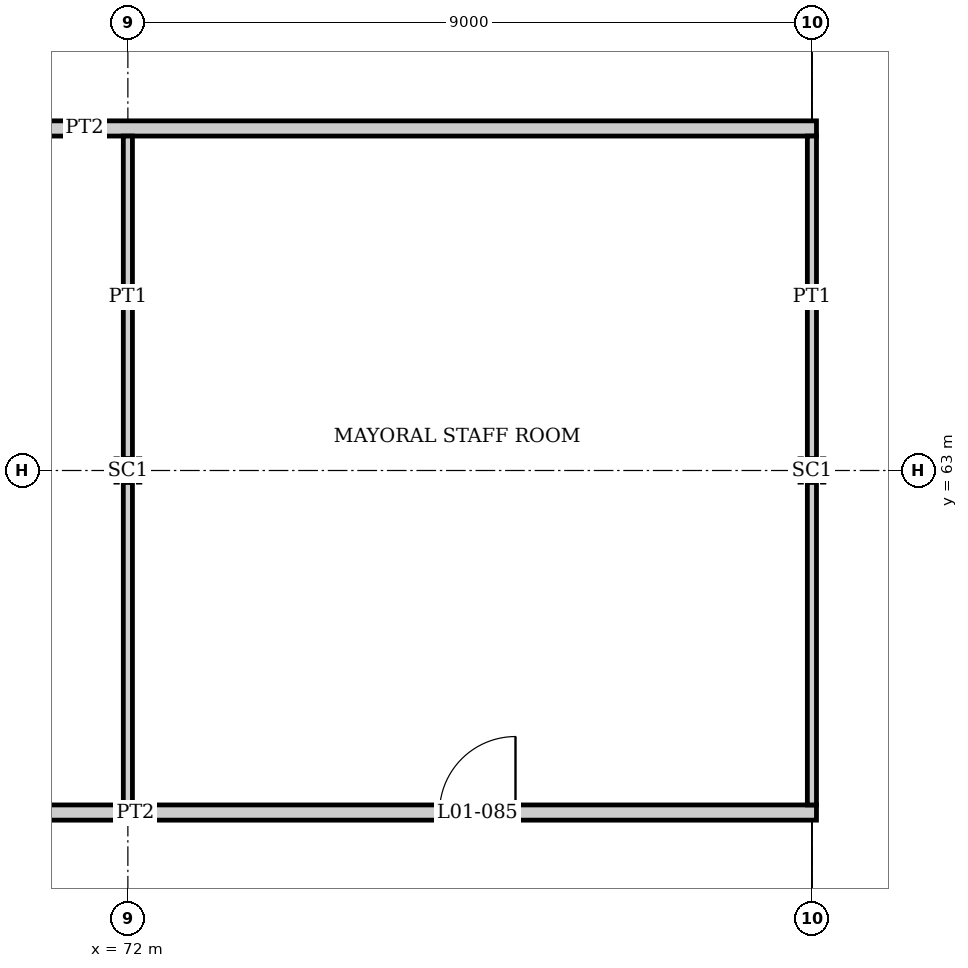
"""IFC4 building model, lengths in metres.
Left out: names, types, materials, properties, quantities, classifications, styles, units other than length and angle.
Written with IfcOpenShell. Run it as: python <this file> out.ifc"""

import sys

from ifc_helpers import new_model, si_unit, direction, frame, frame_2d, origin, origin_2d, place, context, subcontext, project, spatial, rectangle, i_section, extrude, element, fill, save


model = new_model("IFC4")
c1 = context("Model", 3, precision=1e-05, world=origin(), true_north=direction((0.0, 1.0)))
c2 = subcontext(c1, "Body", "Model", "MODEL_VIEW")
j1 = project(units=[si_unit("LENGTHUNIT", "METRE"), si_unit("PLANEANGLEUNIT", "RADIAN")], contexts=[c1])
p1 = place(None, origin())
s1 = spatial("IfcSite", under=j1, at=p1, CompositionType="ELEMENT")
p2 = place(p1, origin())
s2 = spatial("IfcBuilding", under=s1, at=p2, CompositionType="ELEMENT")
p3 = place(p2, frame((0.0, 0.0, 6.0)))
s3 = spatial("IfcBuildingStorey", under=s2, at=p3, CompositionType="ELEMENT", Elevation=6.0)
for number, where, z_axis, x_axis in (
    (1, (72.0, 63.0, 0.0), (0.0, 0.0, 1.0), (0.0, 1.0, 0.0)),
    (2, (81.0, 63.0, 0.0), (0.0, 0.0, 1.0), (0.0, 1.0, 0.0)),
):
    element("IfcColumn", number, at=place(p3, frame(where, z_axis=z_axis, x_axis=x_axis)), inside=s3, PredefinedType="COLUMN", context=c2, shape_type="SweptSolid", body=[
        extrude(i_section(OverallWidth=0.307, OverallDepth=0.315, WebThickness=0.012, FlangeThickness=0.019, at=origin_2d()), origin(), (0.0, 0.0, 1.0), 4.5),
    ])
p4 = place(p3, frame((62.94, 58.5, 0.0), z_axis=(0.0, 0.0, 1.0), x_axis=(1.0, 0.0, 0.0)))
e3 = element("IfcWall", 3, at=p4, inside=s3, PredefinedType="PARTITIONING", context=c2, shape_type="SweptSolid", body=[
    extrude(rectangle(XDim=18.12, YDim=0.2, at=frame_2d((9.06, 0.0))), origin(), (0.0, 0.0, 1.0), 3.947),
])
p5 = place(p4, frame((4.16, 0.0, 0.0)))
e4 = element("IfcOpeningElement", 4, at=p5, cuts=e3, PredefinedType="OPENING", context=c2, shape_type="SweptSolid", body=[
    extrude(rectangle(XDim=1.0, YDim=2.1, at=frame_2d((0.5, 1.05))), frame((0.0, 0.11, 0.0), z_axis=(0.0, -1.0, 0.0), x_axis=(1.0, 0.0, 0.0)), (0.0, 0.0, 1.0), 0.22),
])
p6 = place(p4, frame((13.16, 0.0, 0.0)))
e5 = element("IfcOpeningElement", 5, at=p6, cuts=e3, PredefinedType="OPENING", context=c2, shape_type="SweptSolid", body=[
    extrude(rectangle(XDim=1.0, YDim=2.1, at=frame_2d((0.5, 1.05))), frame((0.0, 0.11, 0.0), z_axis=(0.0, -1.0, 0.0), x_axis=(1.0, 0.0, 0.0)), (0.0, 0.0, 1.0), 0.22),
])
p7 = place(p3, frame((35.9, 67.5, 0.0), z_axis=(0.0, 0.0, 1.0), x_axis=(1.0, 0.0, 0.0)))
e6 = element("IfcWall", 6, at=p7, inside=s3, PredefinedType="PARTITIONING", context=c2, shape_type="SweptSolid", body=[
    extrude(rectangle(XDim=45.16, YDim=0.2, at=frame_2d((22.58, 0.0))), origin(), (0.0, 0.0, 1.0), 3.947),
])
for number, where, z_axis, x_axis in (
    (7, (72.0, 58.6, 0.0), (0.0, 0.0, 1.0), (0.0, 1.0, 0.0)),
    (8, (72.0, 63.157, 0.0), (0.0, 0.0, 1.0), (0.0, 1.0, 0.0)),
    (9, (81.0, 58.6, 0.0), (0.0, 0.0, 1.0), (0.0, 1.0, 0.0)),
):
    element("IfcWall", number, at=place(p3, frame(where, z_axis=z_axis, x_axis=x_axis)), inside=s3, PredefinedType="PARTITIONING", context=c2, shape_type="SweptSolid", body=[
        extrude(rectangle(XDim=4.242, YDim=0.12, at=frame_2d((2.121, 0.0))), origin(), (0.0, 0.0, 1.0), 3.947),
    ])
p8 = place(p3, frame((81.0, 63.157, 0.0), z_axis=(0.0, 0.0, 1.0), x_axis=(0.0, 1.0, 0.0)))
e10 = element("IfcWall", 10, at=p8, inside=s3, PredefinedType="PARTITIONING", context=c2, shape_type="SweptSolid", body=[
    extrude(rectangle(XDim=4.242, YDim=0.12, at=frame_2d((2.121, 0.0))), origin(), (0.0, 0.0, 1.0), 3.994),
])
p9 = place(p6, origin())
e11 = element("IfcDoor", 11, at=p9, inside=s3, OperationType="SINGLE_SWING_RIGHT", PredefinedType="DOOR", context=c2, shape_type="SweptSolid", body=[
    extrude(rectangle(XDim=1.0, YDim=2.1, at=frame_2d((0.5, 1.05))), frame((0.0, 0.025, 0.0), z_axis=(0.0, -1.0, 0.0), x_axis=(1.0, 0.0, 0.0)), (0.0, 0.0, 1.0), 0.05),
])
fill(e5, e11)
save(model, sys.argv[1])
